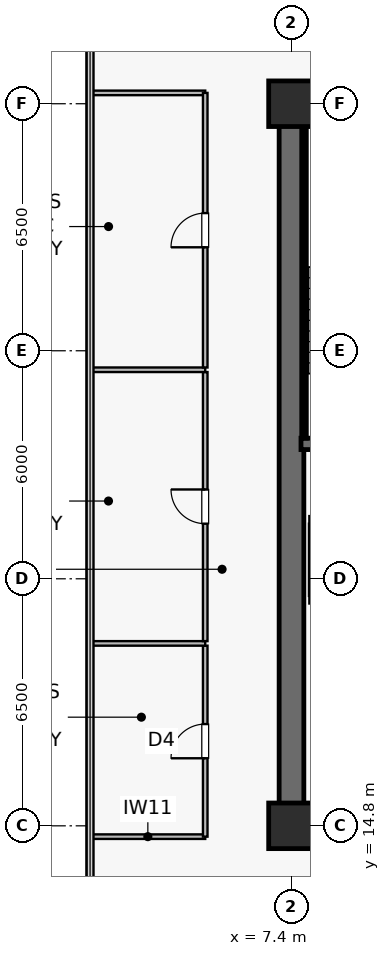
"""IFC4 building model, lengths in metres.
Left out: names, types, materials, properties, quantities, classifications, styles, units other than length and angle.
Written with IfcOpenShell. Run it as: python <this file> out.ifc"""

import sys

from ifc_helpers import new_model, si_unit, direction, frame, frame_2d, origin, origin_2d, place, context, subcontext, project, spatial, rectangle, extrude, source, transform, mapped, element, fill, save


model = new_model("IFC4")
c1 = context("Model", 3, precision=1e-05, world=origin(), true_north=direction((0.0, 1.0)))
c2 = subcontext(c1, "Body", "Model", "MODEL_VIEW")
j1 = project(units=[si_unit("LENGTHUNIT", "METRE"), si_unit("PLANEANGLEUNIT", "RADIAN")], contexts=[c1])
p1 = place(None, origin())
s1 = spatial("IfcSite", under=j1, at=p1, CompositionType="ELEMENT")
p2 = place(p1, origin())
s2 = spatial("IfcBuilding", under=s1, at=p2, CompositionType="ELEMENT")
p3 = place(p2, frame((0.0, 0.0, 137.9)))
s3 = spatial("IfcBuildingStorey", under=s2, at=p3, CompositionType="ELEMENT", Elevation=137.9)
p4 = place(p3, frame((7.075, 14.8, 0.0), z_axis=(0.0, 0.0, 1.0), x_axis=(1.0, 0.0, 0.0)))
e1 = element("IfcWall", 1, at=p4, inside=s3, PredefinedType="SHEAR", context=c2, shape_type="SweptSolid", body=[
    extrude(rectangle(XDim=15.45, YDim=0.65, at=frame_2d((7.725, 0.0))), origin(), (0.0, 0.0, 1.0), 3.79),
])
p5 = place(p3, frame((7.075, 33.8, 0.0), z_axis=(0.0, 0.0, 1.0), x_axis=(1.0, 0.0, 0.0)))
e2 = element("IfcWall", 2, at=p5, inside=s3, PredefinedType="SHEAR", context=c2, shape_type="SweptSolid", body=[
    extrude(rectangle(XDim=15.45, YDim=0.65, at=frame_2d((7.725, 0.0))), origin(), (0.0, 0.0, 1.0), 3.79),
])
p6 = place(p5, frame((5.25, 0.0, 0.0)))
e3 = element("IfcOpeningElement", 3, at=p6, cuts=e2, PredefinedType="OPENING", context=c2, shape_type="SweptSolid", body=[
    extrude(rectangle(XDim=0.95, YDim=2.15, at=frame_2d((0.475, 1.075))), frame((0.0, 0.335, 0.0), z_axis=(0.0, -1.0, 0.0), x_axis=(1.0, 0.0, 0.0)), (0.0, 0.0, 1.0), 0.67),
])
p7 = place(p5, frame((7.765, 0.0, 0.0)))
e4 = element("IfcOpeningElement", 4, at=p7, cuts=e2, PredefinedType="OPENING", context=c2, shape_type="SweptSolid", body=[
    extrude(rectangle(XDim=0.95, YDim=2.15, at=frame_2d((0.475, 1.075))), frame((0.0, 0.335, 0.0), z_axis=(0.0, -1.0, 0.0), x_axis=(1.0, 0.0, 0.0)), (0.0, 0.0, 1.0), 0.67),
])
p8 = place(p5, frame((10.315, 0.0, 0.0)))
e5 = element("IfcOpeningElement", 5, at=p8, cuts=e2, PredefinedType="OPENING", context=c2, shape_type="SweptSolid", body=[
    extrude(rectangle(XDim=0.95, YDim=2.15, at=frame_2d((0.475, 1.075))), frame((0.0, 0.335, 0.0), z_axis=(0.0, -1.0, 0.0), x_axis=(1.0, 0.0, 0.0)), (0.0, 0.0, 1.0), 0.67),
])
p9 = place(p5, frame((12.865, 0.0, 0.0)))
e6 = element("IfcOpeningElement", 6, at=p9, cuts=e2, PredefinedType="OPENING", context=c2, shape_type="SweptSolid", body=[
    extrude(rectangle(XDim=0.95, YDim=2.15, at=frame_2d((0.475, 1.075))), frame((0.0, 0.335, 0.0), z_axis=(0.0, -1.0, 0.0), x_axis=(1.0, 0.0, 0.0)), (0.0, 0.0, 1.0), 0.67),
])
p10 = place(p3, frame((7.4, 15.125, 0.0), z_axis=(0.0, 0.0, 1.0), x_axis=(0.0, 1.0, 0.0)))
e7 = element("IfcWall", 7, at=p10, inside=s3, PredefinedType="SHEAR", context=c2, shape_type="SweptSolid", body=[
    extrude(rectangle(XDim=18.35, YDim=0.65, at=frame_2d((9.175, 0.0))), origin(), (0.0, 0.0, 1.0), 3.79),
])
p11 = place(p3, frame((7.65, 24.85, 0.0), z_axis=(0.0, 0.0, 1.0), x_axis=(1.0, 0.0, 0.0)))
e8 = element("IfcWall", 8, at=p11, inside=s3, PredefinedType="SHEAR", context=c2, shape_type="SweptSolid", body=[
    extrude(rectangle(XDim=3.8, YDim=0.3, at=frame_2d((1.9, 0.0))), origin(), (0.0, 0.0, 1.0), 3.79),
])
p12 = place(p3, frame((7.73, 33.4, 0.0), z_axis=(0.0, 0.0, 1.0), x_axis=(1.0, 0.0, 0.0)))
e9 = element("IfcWall", 9, at=p12, inside=s3, PredefinedType="SOLIDWALL", context=c2, shape_type="SweptSolid", body=[
    extrude(rectangle(XDim=3.72, YDim=0.12, at=frame_2d((1.86, 0.0))), origin(), (0.0, 0.0, 1.0), 3.79),
])
p13 = place(p3, frame((7.73, 25.0, 0.0), z_axis=(0.0, 0.0, 1.0), x_axis=(0.0, 1.0, 0.0)))
e10 = element("IfcWall", 10, at=p13, inside=s3, PredefinedType="SOLIDWALL", context=c2, shape_type="SweptSolid", body=[
    extrude(rectangle(XDim=8.32, YDim=0.12, at=frame_2d((4.16, 0.0))), origin(), (0.0, 0.0, 1.0), 3.79),
])
m1 = source(origin(), c2, "Body", "SweptSolid", [
    extrude(rectangle(XDim=1.2, YDim=1.2, at=origin_2d()), origin(), (0.0, 0.0, 1.0), 4.1),
])
for number, where, z_axis, x_axis in (
    (11, (7.4, 14.8, 0.0), (0.0, 0.0, 1.0), (1.0, 0.0, 0.0)),
    (12, (7.4, 33.8, 0.0), (0.0, 0.0, 1.0), (1.0, 0.0, 0.0)),
):
    element("IfcColumn", number, at=place(p3, frame(where, z_axis=z_axis, x_axis=x_axis)), inside=s3, PredefinedType="COLUMN", context=c2, shape_type="MappedRepresentation", body=[
        mapped(m1, transform((0.0, 0.0, 0.0), scale=1.0)),
    ])
for number, where, z_axis, x_axis in (
    (13, (7.87, 20.75, 0.0), (0.0, 0.0, 1.0), (1.0, 0.0, 0.0)),
    (14, (7.87, 22.85, 0.0), (0.0, 0.0, 1.0), (1.0, 0.0, 0.0)),
):
    element("IfcWall", number, at=place(p3, frame(where, z_axis=z_axis, x_axis=x_axis)), inside=s3, PredefinedType="SOLIDWALL", context=c2, shape_type="SweptSolid", body=[
        extrude(rectangle(XDim=2.26, YDim=0.2, at=frame_2d((1.13, 0.0))), origin(), (0.0, 0.0, 1.0), 3.79),
    ])
p14 = place(p3, frame((7.95, 20.85, 0.0), z_axis=(0.0, 0.0, 1.0), x_axis=(0.0, 1.0, 0.0)))
e15 = element("IfcWall", 15, at=p14, inside=s3, PredefinedType="SOLIDWALL", context=c2, shape_type="SweptSolid", body=[
    extrude(rectangle(XDim=1.9, YDim=0.18, at=frame_2d((0.95, 0.0))), origin(), (0.0, 0.0, 1.0), 3.79),
])
for number, where, z_axis, x_axis in (
    (16, (2.11, 14.515, 0.0), (0.0, 0.0, 1.0), (1.0, 0.0, 0.0)),
    (17, (2.11, 34.085, 0.0), (0.0, 0.0, 1.0), (1.0, 0.0, 0.0)),
):
    element("IfcWall", number, at=place(p3, frame(where, z_axis=z_axis, x_axis=x_axis)), inside=s3, PredefinedType="PARTITIONING", context=c2, shape_type="SweptSolid", body=[
        extrude(rectangle(XDim=3.02, YDim=0.12, at=frame_2d((1.51, 0.0))), origin(), (0.0, 0.0, 1.0), 3.79),
    ])
p15 = place(p3, frame((5.13, 14.515, 0.0), z_axis=(0.0, 0.0, 1.0), x_axis=(0.0, 1.0, 0.0)))
e18 = element("IfcWall", 18, at=p15, inside=s3, PredefinedType="PARTITIONING", context=c2, shape_type="SweptSolid", body=[
    extrude(rectangle(XDim=5.025, YDim=0.12, at=frame_2d((2.513, 0.0))), origin(), (0.0, 0.0, 1.0), 3.79),
])
p16 = place(p15, frame((2.062, 0.0, 0.0)))
e19 = element("IfcOpeningElement", 19, at=p16, cuts=e18, PredefinedType="OPENING", context=c2, shape_type="SweptSolid", body=[
    extrude(rectangle(XDim=0.9, YDim=2.1, at=frame_2d((0.45, 1.05))), frame((0.0, 0.07, 0.0), z_axis=(0.0, -1.0, 0.0), x_axis=(1.0, 0.0, 0.0)), (0.0, 0.0, 1.0), 0.14),
])
p17 = place(p3, frame((2.11, 19.6, 0.0), z_axis=(0.0, 0.0, 1.0), x_axis=(1.0, 0.0, 0.0)))
e20 = element("IfcWall", 20, at=p17, inside=s3, PredefinedType="PARTITIONING", context=c2, shape_type="SweptSolid", body=[
    extrude(rectangle(XDim=3.02, YDim=0.12, at=frame_2d((1.51, 0.0))), origin(), (0.0, 0.0, 1.0), 3.79),
])
p18 = place(p3, frame((5.13, 19.66, 0.0), z_axis=(0.0, 0.0, 1.0), x_axis=(0.0, 1.0, 0.0)))
e21 = element("IfcWall", 21, at=p18, inside=s3, PredefinedType="PARTITIONING", context=c2, shape_type="SweptSolid", body=[
    extrude(rectangle(XDim=7.08, YDim=0.12, at=frame_2d((3.54, 0.0))), origin(), (0.0, 0.0, 1.0), 3.79),
])
p19 = place(p18, frame((3.09, 0.0, 0.0)))
e22 = element("IfcOpeningElement", 22, at=p19, cuts=e21, PredefinedType="OPENING", context=c2, shape_type="SweptSolid", body=[
    extrude(rectangle(XDim=0.9, YDim=2.1, at=frame_2d((0.45, 1.05))), frame((0.0, 0.07, 0.0), z_axis=(0.0, -1.0, 0.0), x_axis=(1.0, 0.0, 0.0)), (0.0, 0.0, 1.0), 0.14),
])
p20 = place(p3, frame((2.11, 26.8, 0.0), z_axis=(0.0, 0.0, 1.0), x_axis=(1.0, 0.0, 0.0)))
e23 = element("IfcWall", 23, at=p20, inside=s3, PredefinedType="PARTITIONING", context=c2, shape_type="SweptSolid", body=[
    extrude(rectangle(XDim=3.02, YDim=0.12, at=frame_2d((1.51, 0.0))), origin(), (0.0, 0.0, 1.0), 3.79),
])
p21 = place(p3, frame((5.13, 26.86, 0.0), z_axis=(0.0, 0.0, 1.0), x_axis=(0.0, 1.0, 0.0)))
e24 = element("IfcWall", 24, at=p21, inside=s3, PredefinedType="PARTITIONING", context=c2, shape_type="SweptSolid", body=[
    extrude(rectangle(XDim=7.225, YDim=0.12, at=frame_2d((3.612, 0.0))), origin(), (0.0, 0.0, 1.0), 3.79),
])
p22 = place(p21, frame((3.163, 0.0, 0.0)))
e25 = element("IfcOpeningElement", 25, at=p22, cuts=e24, PredefinedType="OPENING", context=c2, shape_type="SweptSolid", body=[
    extrude(rectangle(XDim=0.9, YDim=2.1, at=frame_2d((0.45, 1.05))), frame((0.0, 0.07, 0.0), z_axis=(0.0, -1.0, 0.0), x_axis=(1.0, 0.0, 0.0)), (0.0, 0.0, 1.0), 0.14),
])
m2 = source(origin(), c2, "Body", "SweptSolid", [
    extrude(rectangle(XDim=0.9, YDim=2.1, at=frame_2d((0.45, 1.05))), frame((0.0, 0.025, 0.0), z_axis=(0.0, -1.0, 0.0), x_axis=(1.0, 0.0, 0.0)), (0.0, 0.0, 1.0), 0.05),
])
p23 = place(p16, origin())
e26 = element("IfcDoor", 26, at=p23, inside=s3, OperationType="SINGLE_SWING_LEFT", PredefinedType="DOOR", context=c2, shape_type="MappedRepresentation", body=[
    mapped(m2, transform((0.0, 0.0, 0.0), scale=1.0)),
])
fill(e19, e26)
p24 = place(p19, origin())
e27 = element("IfcDoor", 27, at=p24, inside=s3, OperationType="SINGLE_SWING_RIGHT", PredefinedType="DOOR", context=c2, shape_type="MappedRepresentation", body=[
    mapped(m2, transform((0.0, 0.0, 0.0), scale=1.0)),
])
fill(e22, e27)
p25 = place(p22, origin())
e28 = element("IfcDoor", 28, at=p25, inside=s3, OperationType="SINGLE_SWING_LEFT", PredefinedType="DOOR", context=c2, shape_type="MappedRepresentation", body=[
    mapped(m2, transform((0.0, 0.0, 0.0), scale=1.0)),
])
fill(e25, e28)
save(model, sys.argv[1])
